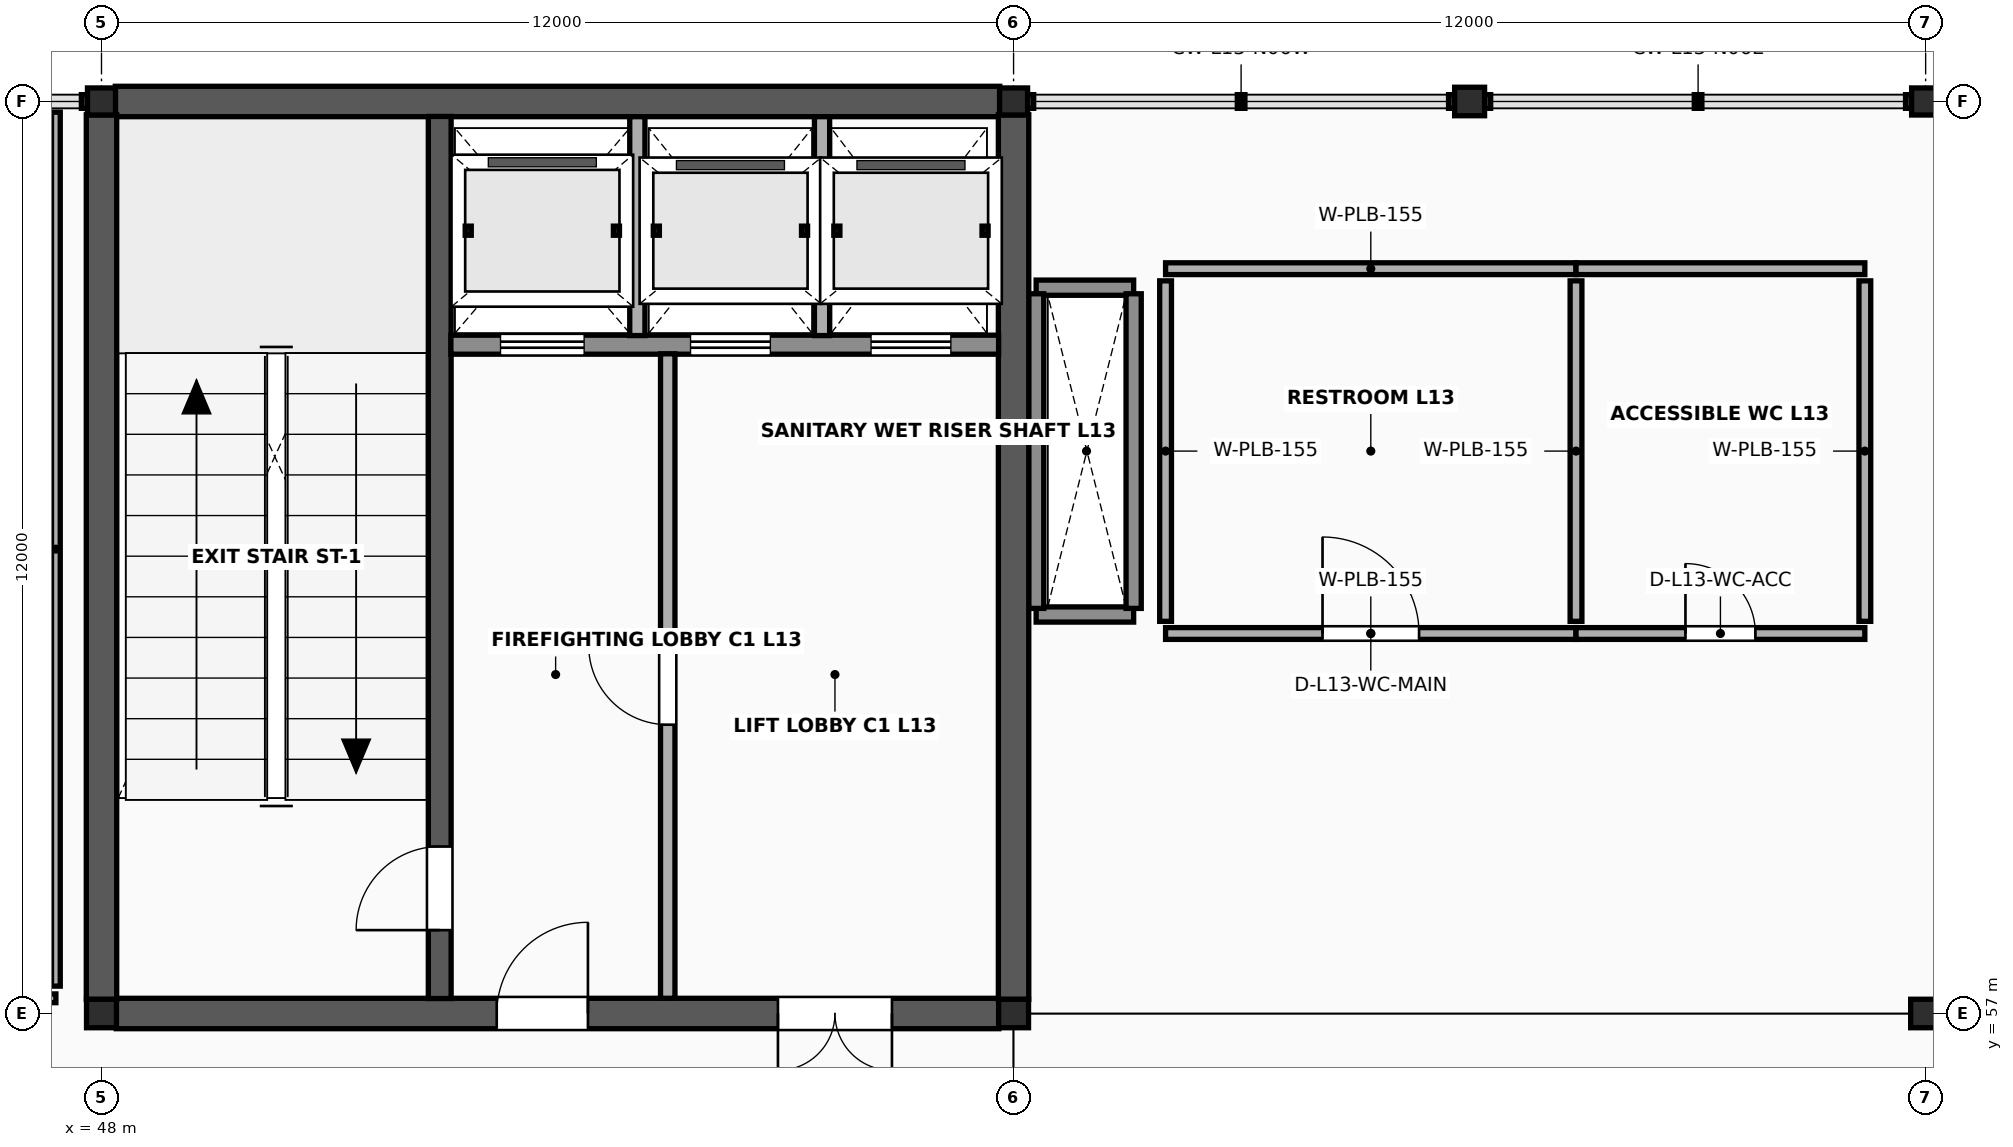
"""IFC4 building model, lengths in metres.
Left out: names, types, materials, properties, quantities, classifications, styles, units other than length and angle.
Written with IfcOpenShell. Run it as: python <this file> out.ifc"""

import sys

from ifc_helpers import new_model, si_unit, direction, frame, frame_2d, origin, origin_2d, place, context, subcontext, project, spatial, rectangle, i_section, extrude, element, fill, save


model = new_model("IFC4")
c1 = context("Model", 3, precision=1e-05, world=origin(), true_north=direction((0.0, 1.0)))
c2 = subcontext(c1, "Body", "Model", "MODEL_VIEW")
j1 = project(units=[si_unit("LENGTHUNIT", "METRE"), si_unit("PLANEANGLEUNIT", "RADIAN")], contexts=[c1])
p1 = place(None, origin())
s1 = spatial("IfcSite", under=j1, at=p1, CompositionType="ELEMENT")
p2 = place(p1, origin())
s2 = spatial("IfcBuilding", under=s1, at=p2, CompositionType="ELEMENT")
p3 = place(p2, frame((0.0, 0.0, 53.6)))
s3 = spatial("IfcBuildingStorey", under=s2, at=p3, CompositionType="ELEMENT", Elevation=53.6)
p4 = place(p3, frame((48.0, 57.0, 0.0), z_axis=(0.0, 0.0, 1.0), x_axis=(1.0, 0.0, 0.0)))
e1 = element("IfcColumn", 1, at=p4, inside=s3, PredefinedType="COLUMN", context=c2, shape_type="SweptSolid", body=[
    extrude(i_section(OverallWidth=0.394, OverallDepth=0.375, WebThickness=0.017, FlangeThickness=0.028, FilletRadius=0.018, at=origin_2d()), origin(), (0.0, 0.0, 1.0), 4.0),
])
p5 = place(p3, frame((48.0, 69.0, 0.0), z_axis=(0.0, 0.0, 1.0), x_axis=(1.0, 0.0, 0.0)))
e2 = element("IfcColumn", 2, at=p5, inside=s3, PredefinedType="COLUMN", context=c2, shape_type="SweptSolid", body=[
    extrude(i_section(OverallWidth=0.369, OverallDepth=0.356, WebThickness=0.011, FlangeThickness=0.018, FilletRadius=0.018, at=origin_2d()), origin(), (0.0, 0.0, 1.0), 4.0),
])
p6 = place(p3, frame((60.0, 57.0, 0.0), z_axis=(0.0, 0.0, 1.0), x_axis=(1.0, 0.0, 0.0)))
e3 = element("IfcColumn", 3, at=p6, inside=s3, PredefinedType="COLUMN", context=c2, shape_type="SweptSolid", body=[
    extrude(i_section(OverallWidth=0.394, OverallDepth=0.375, WebThickness=0.017, FlangeThickness=0.028, FilletRadius=0.018, at=origin_2d()), origin(), (0.0, 0.0, 1.0), 4.0),
])
p7 = place(p3, frame((60.0, 69.0, 0.0), z_axis=(0.0, 0.0, 1.0), x_axis=(1.0, 0.0, 0.0)))
e4 = element("IfcColumn", 4, at=p7, inside=s3, PredefinedType="COLUMN", context=c2, shape_type="SweptSolid", body=[
    extrude(i_section(OverallWidth=0.369, OverallDepth=0.356, WebThickness=0.011, FlangeThickness=0.018, FilletRadius=0.018, at=origin_2d()), origin(), (0.0, 0.0, 1.0), 4.0),
])
p8 = place(p3, frame((72.0, 57.0, 0.0), z_axis=(0.0, 0.0, 1.0), x_axis=(1.0, 0.0, 0.0)))
e5 = element("IfcColumn", 5, at=p8, inside=s3, PredefinedType="COLUMN", context=c2, shape_type="SweptSolid", body=[
    extrude(i_section(OverallWidth=0.394, OverallDepth=0.375, WebThickness=0.017, FlangeThickness=0.028, FilletRadius=0.018, at=origin_2d()), origin(), (0.0, 0.0, 1.0), 4.0),
])
p9 = place(p3, frame((72.0, 69.0, 0.0), z_axis=(0.0, 0.0, 1.0), x_axis=(1.0, 0.0, 0.0)))
e6 = element("IfcColumn", 6, at=p9, inside=s3, PredefinedType="COLUMN", context=c2, shape_type="SweptSolid", body=[
    extrude(i_section(OverallWidth=0.369, OverallDepth=0.356, WebThickness=0.011, FlangeThickness=0.018, FilletRadius=0.018, at=origin_2d()), origin(), (0.0, 0.0, 1.0), 4.0),
])
p10 = place(p3, frame((66.0, 69.0, 0.0), z_axis=(0.0, 0.0, 1.0), x_axis=(1.0, 0.0, 0.0)))
e7 = element("IfcColumn", 7, at=p10, inside=s3, PredefinedType="COLUMN", context=c2, shape_type="SweptSolid", body=[
    extrude(i_section(OverallWidth=0.394, OverallDepth=0.375, WebThickness=0.017, FlangeThickness=0.028, FilletRadius=0.018, at=origin_2d()), origin(), (0.0, 0.0, 1.0), 4.0),
])
for number, where, z_axis, x_axis in (
    (8, (60.297, 62.25, 0.0), (0.0, 0.0, 1.0), (1.0, 0.0, 0.0)),
    (9, (60.297, 66.55, 0.0), (0.0, 0.0, 1.0), (1.0, 0.0, 0.0)),
):
    element("IfcWall", number, at=place(p3, frame(where, z_axis=z_axis, x_axis=x_axis)), inside=s3, PredefinedType="SOLIDWALL", context=c2, shape_type="SweptSolid", body=[
        extrude(rectangle(XDim=1.283, YDim=0.2, at=frame_2d((0.642, 0.0))), origin(), (0.0, 0.0, 1.0), 3.818),
    ])
for number, where, z_axis, x_axis in (
    (10, (60.297, 62.33, 0.0), (0.0, 0.0, 1.0), (0.0, 1.0, 0.0)),
    (11, (61.58, 62.33, 0.0), (0.0, 0.0, 1.0), (0.0, 1.0, 0.0)),
):
    element("IfcWall", number, at=place(p3, frame(where, z_axis=z_axis, x_axis=x_axis)), inside=s3, PredefinedType="SOLIDWALL", context=c2, shape_type="SweptSolid", body=[
        extrude(rectangle(XDim=4.14, YDim=0.2, at=frame_2d((2.07, 0.0))), origin(), (0.0, 0.0, 1.0), 3.818),
    ])
p11 = place(p3, frame((48.194, 57.0, 0.0), z_axis=(0.0, 0.0, 1.0), x_axis=(1.0, 0.0, 0.0)))
e12 = element("IfcWall", 12, at=p11, inside=s3, PredefinedType="SHEAR", context=c2, shape_type="SweptSolid", body=[
    extrude(rectangle(XDim=11.612, YDim=0.4, at=frame_2d((5.806, 0.0))), origin(), (0.0, 0.0, 1.0), 3.818),
])
p12 = place(p11, frame((5.006, 0.0, 0.0)))
e13 = element("IfcOpeningElement", 13, at=p12, cuts=e12, PredefinedType="OPENING", context=c2, shape_type="SweptSolid", body=[
    extrude(rectangle(XDim=1.2, YDim=2.2, at=frame_2d((0.6, 1.1))), frame((0.0, 0.215, 0.0), z_axis=(0.0, -1.0, 0.0), x_axis=(1.0, 0.0, 0.0)), (0.0, 0.0, 1.0), 0.43),
])
p13 = place(p11, frame((8.706, 0.0, 0.0)))
e14 = element("IfcOpeningElement", 14, at=p13, cuts=e12, PredefinedType="OPENING", context=c2, shape_type="SweptSolid", body=[
    extrude(rectangle(XDim=1.5, YDim=2.25, at=frame_2d((0.75, 1.125))), frame((0.0, 0.215, 0.0), z_axis=(0.0, -1.0, 0.0), x_axis=(1.0, 0.0, 0.0)), (0.0, 0.0, 1.0), 0.43),
])
p14 = place(p3, frame((48.181, 69.0, 0.0), z_axis=(0.0, 0.0, 1.0), x_axis=(1.0, 0.0, 0.0)))
e15 = element("IfcWall", 15, at=p14, inside=s3, PredefinedType="SHEAR", context=c2, shape_type="SweptSolid", body=[
    extrude(rectangle(XDim=11.637, YDim=0.4, at=frame_2d((5.819, 0.0))), origin(), (0.0, 0.0, 1.0), 3.818),
])
for number, where, z_axis, x_axis in (
    (16, (48.0, 57.185, 0.0), (0.0, 0.0, 1.0), (0.0, 1.0, 0.0)),
    (17, (60.0, 57.185, 0.0), (0.0, 0.0, 1.0), (0.0, 1.0, 0.0)),
):
    element("IfcWall", number, at=place(p3, frame(where, z_axis=z_axis, x_axis=x_axis)), inside=s3, PredefinedType="SHEAR", context=c2, shape_type="SweptSolid", body=[
        extrude(rectangle(XDim=11.64, YDim=0.4, at=frame_2d((5.82, 0.0))), origin(), (0.0, 0.0, 1.0), 3.818),
    ])
p15 = place(p3, frame((52.45, 57.197, 0.0), z_axis=(0.0, 0.0, 1.0), x_axis=(0.0, 1.0, 0.0)))
e18 = element("IfcWall", 18, at=p15, inside=s3, PredefinedType="SHEAR", context=c2, shape_type="SweptSolid", body=[
    extrude(rectangle(XDim=11.606, YDim=0.3, at=frame_2d((5.803, 0.0))), origin(), (0.0, 0.0, 1.0), 3.818),
])
p16 = place(p15, frame((0.9, 0.0, 0.0)))
e19 = element("IfcOpeningElement", 19, at=p16, cuts=e18, PredefinedType="OPENING", context=c2, shape_type="SweptSolid", body=[
    extrude(rectangle(XDim=1.1, YDim=2.2, at=frame_2d((0.55, 1.1))), frame((0.0, 0.165, 0.0), z_axis=(0.0, -1.0, 0.0), x_axis=(1.0, 0.0, 0.0)), (0.0, 0.0, 1.0), 0.33),
])
p17 = place(p3, frame((52.597, 65.8, 0.0), z_axis=(0.0, 0.0, 1.0), x_axis=(1.0, 0.0, 0.0)))
e20 = element("IfcWall", 20, at=p17, inside=s3, PredefinedType="SOLIDWALL", context=c2, shape_type="SweptSolid", body=[
    extrude(rectangle(XDim=7.206, YDim=0.25, at=frame_2d((3.603, 0.0))), origin(), (0.0, 0.0, 1.0), 3.818),
])
p18 = place(p17, frame((0.653, 0.0, 0.0)))
e21 = element("IfcOpeningElement", 21, at=p18, cuts=e20, PredefinedType="OPENING", context=c2, shape_type="SweptSolid", body=[
    extrude(rectangle(XDim=1.1, YDim=2.24, at=frame_2d((0.55, 1.12))), frame((0.0, 0.14, 0.0), z_axis=(0.0, -1.0, 0.0), x_axis=(1.0, 0.0, 0.0)), (0.0, 0.0, 1.0), 0.28),
])
p19 = place(p17, frame((3.153, 0.0, 0.0)))
e22 = element("IfcOpeningElement", 22, at=p19, cuts=e20, PredefinedType="OPENING", context=c2, shape_type="SweptSolid", body=[
    extrude(rectangle(XDim=1.05, YDim=2.2, at=frame_2d((0.525, 1.1))), frame((0.0, 0.14, 0.0), z_axis=(0.0, -1.0, 0.0), x_axis=(1.0, 0.0, 0.0)), (0.0, 0.0, 1.0), 0.28),
])
p20 = place(p17, frame((5.528, 0.0, 0.0)))
e23 = element("IfcOpeningElement", 23, at=p20, cuts=e20, PredefinedType="OPENING", context=c2, shape_type="SweptSolid", body=[
    extrude(rectangle(XDim=1.05, YDim=2.2, at=frame_2d((0.525, 1.1))), frame((0.0, 0.14, 0.0), z_axis=(0.0, -1.0, 0.0), x_axis=(1.0, 0.0, 0.0)), (0.0, 0.0, 1.0), 0.28),
])
for number, where, z_axis, x_axis in (
    (24, (55.05, 65.92, 0.0), (0.0, 0.0, 1.0), (0.0, 1.0, 0.0)),
    (25, (57.48, 65.92, 0.0), (0.0, 0.0, 1.0), (0.0, 1.0, 0.0)),
):
    element("IfcWall", number, at=place(p3, frame(where, z_axis=z_axis, x_axis=x_axis)), inside=s3, PredefinedType="SOLIDWALL", context=c2, shape_type="SweptSolid", body=[
        extrude(rectangle(XDim=2.88, YDim=0.2, at=frame_2d((1.44, 0.0))), origin(), (0.0, 0.0, 1.0), 3.808),
    ])
p21 = place(p3, frame((55.45, 57.2, 0.0), z_axis=(0.0, 0.0, 1.0), x_axis=(0.0, 1.0, 0.0)))
e26 = element("IfcWall", 26, at=p21, inside=s3, PredefinedType="SOLIDWALL", context=c2, shape_type="SweptSolid", body=[
    extrude(rectangle(XDim=8.48, YDim=0.19, at=frame_2d((4.24, 0.0))), origin(), (0.0, 0.0, 1.0), 3.808),
])
p22 = place(p21, frame((3.6, 0.0, 0.0)))
e27 = element("IfcOpeningElement", 27, at=p22, cuts=e26, PredefinedType="OPENING", context=c2, shape_type="SweptSolid", body=[
    extrude(rectangle(XDim=1.04, YDim=2.18, at=frame_2d((0.52, 1.09))), frame((0.0, 0.11, 0.0), z_axis=(0.0, -1.0, 0.0), x_axis=(1.0, 0.0, 0.0)), (0.0, 0.0, 1.0), 0.22),
])
p23 = place(p3, frame((62.0, 62.0, 0.0), z_axis=(0.0, 0.0, 1.0), x_axis=(1.0, 0.0, 0.0)))
e28 = element("IfcWall", 28, at=p23, inside=s3, PredefinedType="PLUMBINGWALL", context=c2, shape_type="SweptSolid", body=[
    extrude(rectangle(XDim=5.4, YDim=0.155, at=frame_2d((2.7, 0.0))), origin(), (0.0, 0.0, 1.0), 2.88),
])
p24 = place(p23, frame((2.065, 0.0, 0.0)))
e29 = element("IfcOpeningElement", 29, at=p24, cuts=e28, PredefinedType="OPENING", context=c2, shape_type="SweptSolid", body=[
    extrude(rectangle(XDim=1.27, YDim=2.27, at=frame_2d((0.635, 1.135))), frame((0.0, 0.093, 0.0), z_axis=(0.0, -1.0, 0.0), x_axis=(1.0, 0.0, 0.0)), (0.0, 0.0, 1.0), 0.185),
])
p25 = place(p3, frame((62.0, 66.8, 0.0), z_axis=(0.0, 0.0, 1.0), x_axis=(1.0, 0.0, 0.0)))
e30 = element("IfcWall", 30, at=p25, inside=s3, PredefinedType="PLUMBINGWALL", context=c2, shape_type="SweptSolid", body=[
    extrude(rectangle(XDim=5.4, YDim=0.155, at=frame_2d((2.7, 0.0))), origin(), (0.0, 0.0, 1.0), 2.88),
])
for number, where, z_axis, x_axis in (
    (31, (62.0, 62.16, 0.0), (0.0, 0.0, 1.0), (0.0, 1.0, 0.0)),
    (32, (67.4, 62.16, 0.0), (0.0, 0.0, 1.0), (0.0, 1.0, 0.0)),
):
    element("IfcWall", number, at=place(p3, frame(where, z_axis=z_axis, x_axis=x_axis)), inside=s3, PredefinedType="PLUMBINGWALL", context=c2, shape_type="SweptSolid", body=[
        extrude(rectangle(XDim=4.48, YDim=0.155, at=frame_2d((2.24, 0.0))), origin(), (0.0, 0.0, 1.0), 2.88),
    ])
p26 = place(p3, frame((67.4, 62.0, 0.0), z_axis=(0.0, 0.0, 1.0), x_axis=(1.0, 0.0, 0.0)))
e33 = element("IfcWall", 33, at=p26, inside=s3, PredefinedType="PLUMBINGWALL", context=c2, shape_type="SweptSolid", body=[
    extrude(rectangle(XDim=3.8, YDim=0.155, at=frame_2d((1.9, 0.0))), origin(), (0.0, 0.0, 1.0), 2.88),
])
p27 = place(p26, frame((1.44, 0.0, 0.0)))
e34 = element("IfcOpeningElement", 34, at=p27, cuts=e33, PredefinedType="OPENING", context=c2, shape_type="SweptSolid", body=[
    extrude(rectangle(XDim=0.92, YDim=2.1, at=frame_2d((0.46, 1.05))), frame((0.0, 0.093, 0.0), z_axis=(0.0, -1.0, 0.0), x_axis=(1.0, 0.0, 0.0)), (0.0, 0.0, 1.0), 0.185),
])
p28 = place(p3, frame((67.4, 66.8, 0.0), z_axis=(0.0, 0.0, 1.0), x_axis=(1.0, 0.0, 0.0)))
e35 = element("IfcWall", 35, at=p28, inside=s3, PredefinedType="PLUMBINGWALL", context=c2, shape_type="SweptSolid", body=[
    extrude(rectangle(XDim=3.8, YDim=0.155, at=frame_2d((1.9, 0.0))), origin(), (0.0, 0.0, 1.0), 2.88),
])
p29 = place(p3, frame((71.2, 62.16, 0.0), z_axis=(0.0, 0.0, 1.0), x_axis=(0.0, 1.0, 0.0)))
e36 = element("IfcWall", 36, at=p29, inside=s3, PredefinedType="PLUMBINGWALL", context=c2, shape_type="SweptSolid", body=[
    extrude(rectangle(XDim=4.48, YDim=0.155, at=frame_2d((2.24, 0.0))), origin(), (0.0, 0.0, 1.0), 2.88),
])
p30 = place(p3, frame((36.14, 57.2, 0.0), z_axis=(0.0, 0.0, 1.0), x_axis=(1.0, 0.0, 0.0)))
e37 = element("IfcWall", 37, at=p30, inside=s3, PredefinedType="PARTITIONING", context=c2, shape_type="SweptSolid", body=[
    extrude(rectangle(XDim=11.26, YDim=0.115, at=frame_2d((5.63, 0.0))), origin(), (0.0, 0.0, 1.0), 2.88),
])
p31 = place(p30, frame((5.135, 0.0, 0.0)))
e38 = element("IfcOpeningElement", 38, at=p31, cuts=e37, PredefinedType="OPENING", context=c2, shape_type="SweptSolid", body=[
    extrude(rectangle(XDim=0.99, YDim=2.15, at=frame_2d((0.495, 1.075))), frame((0.0, 0.073, 0.0), z_axis=(0.0, -1.0, 0.0), x_axis=(1.0, 0.0, 0.0)), (0.0, 0.0, 1.0), 0.145),
])
p32 = place(p3, frame((47.4, 57.36, 0.0), z_axis=(0.0, 0.0, 1.0), x_axis=(0.0, 1.0, 0.0)))
e39 = element("IfcWall", 39, at=p32, inside=s3, PredefinedType="PARTITIONING", context=c2, shape_type="SweptSolid", body=[
    extrude(rectangle(XDim=11.5, YDim=0.115, at=frame_2d((5.75, 0.0))), origin(), (0.0, 0.0, 1.0), 2.88),
])
p33 = place(p16, origin())
e40 = element("IfcDoor", 40, at=p33, inside=s3, OperationType="SINGLE_SWING_LEFT", PredefinedType="DOOR", context=c2, shape_type="SweptSolid", body=[
    extrude(rectangle(XDim=1.1, YDim=2.2, at=frame_2d((0.55, 1.1))), frame((0.0, 0.025, 0.0), z_axis=(0.0, -1.0, 0.0), x_axis=(1.0, 0.0, 0.0)), (0.0, 0.0, 1.0), 0.05),
])
fill(e19, e40)
p34 = place(p22, origin())
e41 = element("IfcDoor", 41, at=p34, inside=s3, OperationType="SINGLE_SWING_RIGHT", PredefinedType="DOOR", context=c2, shape_type="SweptSolid", body=[
    extrude(rectangle(XDim=1.04, YDim=2.18, at=frame_2d((0.52, 1.09))), frame((0.0, 0.025, 0.0), z_axis=(0.0, -1.0, 0.0), x_axis=(1.0, 0.0, 0.0)), (0.0, 0.0, 1.0), 0.05),
])
fill(e27, e41)
p35 = place(p12, origin())
e42 = element("IfcDoor", 42, at=p35, inside=s3, OperationType="SINGLE_SWING_RIGHT", PredefinedType="DOOR", context=c2, shape_type="SweptSolid", body=[
    extrude(rectangle(XDim=1.2, YDim=2.2, at=frame_2d((0.6, 1.1))), frame((0.0, 0.025, 0.0), z_axis=(0.0, -1.0, 0.0), x_axis=(1.0, 0.0, 0.0)), (0.0, 0.0, 1.0), 0.05),
])
fill(e13, e42)
p36 = place(p13, origin())
e43 = element("IfcDoor", 43, at=p36, inside=s3, OperationType="DOUBLE_DOOR_SINGLE_SWING", PredefinedType="DOOR", context=c2, shape_type="SweptSolid", body=[
    extrude(rectangle(XDim=1.5, YDim=2.25, at=frame_2d((0.75, 1.125))), frame((0.0, 0.025, 0.0), z_axis=(0.0, -1.0, 0.0), x_axis=(1.0, 0.0, 0.0)), (0.0, 0.0, 1.0), 0.05),
])
fill(e14, e43)
p37 = place(p18, origin())
e44 = element("IfcDoor", 44, at=p37, inside=s3, OperationType="SLIDING_TO_LEFT", PredefinedType="USERDEFINED", context=c2, shape_type="SweptSolid", body=[
    extrude(rectangle(XDim=1.1, YDim=2.24, at=frame_2d((0.55, 1.12))), frame((0.0, 0.025, 0.0), z_axis=(0.0, -1.0, 0.0), x_axis=(1.0, 0.0, 0.0)), (0.0, 0.0, 1.0), 0.05),
])
fill(e21, e44)
p38 = place(p19, origin())
e45 = element("IfcDoor", 45, at=p38, inside=s3, OperationType="SLIDING_TO_LEFT", PredefinedType="USERDEFINED", context=c2, shape_type="SweptSolid", body=[
    extrude(rectangle(XDim=1.05, YDim=2.2, at=frame_2d((0.525, 1.1))), frame((0.0, 0.025, 0.0), z_axis=(0.0, -1.0, 0.0), x_axis=(1.0, 0.0, 0.0)), (0.0, 0.0, 1.0), 0.05),
])
fill(e22, e45)
p39 = place(p20, origin())
e46 = element("IfcDoor", 46, at=p39, inside=s3, OperationType="SLIDING_TO_LEFT", PredefinedType="USERDEFINED", context=c2, shape_type="SweptSolid", body=[
    extrude(rectangle(XDim=1.05, YDim=2.2, at=frame_2d((0.525, 1.1))), frame((0.0, 0.025, 0.0), z_axis=(0.0, -1.0, 0.0), x_axis=(1.0, 0.0, 0.0)), (0.0, 0.0, 1.0), 0.05),
])
fill(e23, e46)
p40 = place(p24, origin())
e47 = element("IfcDoor", 47, at=p40, inside=s3, OperationType="SINGLE_SWING_LEFT", PredefinedType="DOOR", context=c2, shape_type="SweptSolid", body=[
    extrude(rectangle(XDim=1.27, YDim=2.27, at=frame_2d((0.635, 1.135))), frame((0.0, 0.025, 0.0), z_axis=(0.0, -1.0, 0.0), x_axis=(1.0, 0.0, 0.0)), (0.0, 0.0, 1.0), 0.05),
])
fill(e29, e47)
p41 = place(p27, origin())
e48 = element("IfcDoor", 48, at=p41, inside=s3, OperationType="SINGLE_SWING_LEFT", PredefinedType="DOOR", context=c2, shape_type="SweptSolid", body=[
    extrude(rectangle(XDim=0.92, YDim=2.1, at=frame_2d((0.46, 1.05))), frame((0.0, 0.025, 0.0), z_axis=(0.0, -1.0, 0.0), x_axis=(1.0, 0.0, 0.0)), (0.0, 0.0, 1.0), 0.05),
])
fill(e34, e48)
save(model, sys.argv[1])
